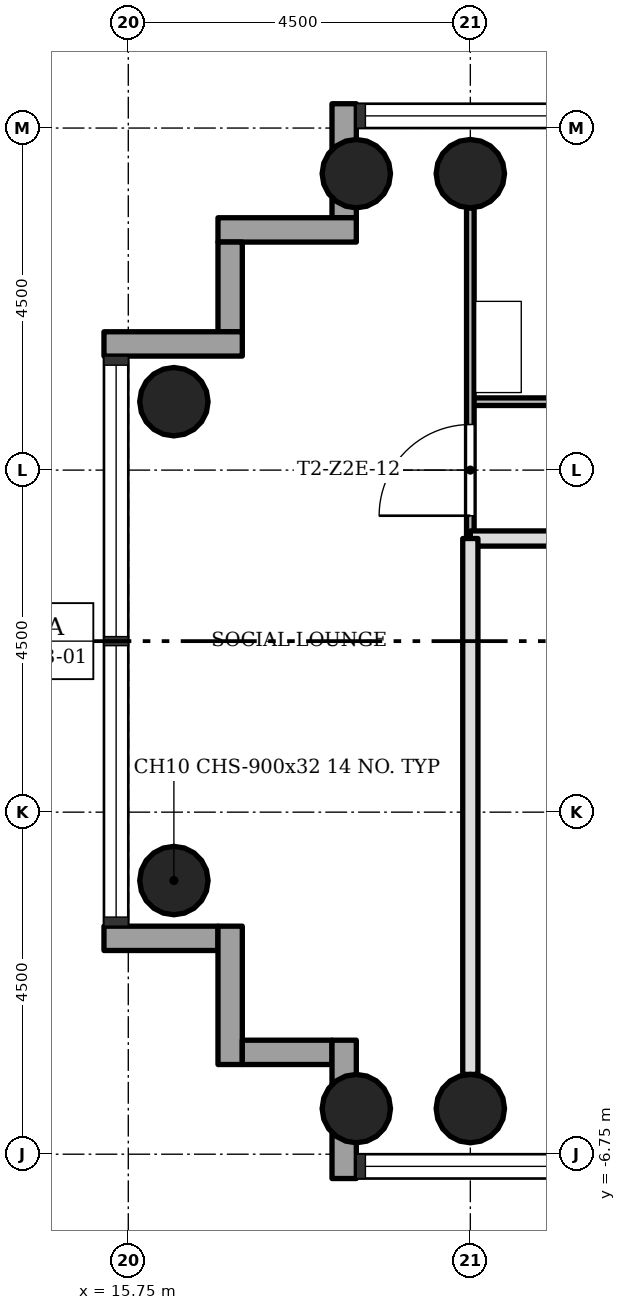
"""IFC4 building model, lengths in metres.
Left out: names, types, materials, properties, quantities, classifications, styles, units other than length and angle.
Written with IfcOpenShell. Run it as: python <this file> out.ifc"""

import sys

from ifc_helpers import new_model, si_unit, direction, frame, frame_2d, origin, origin_2d, place, context, subcontext, project, spatial, rectangle, hollow_circle, extrude, element, fill, save


model = new_model("IFC4")
c1 = context("Model", 3, precision=1e-05, world=origin(), true_north=direction((0.0, 1.0)))
c2 = subcontext(c1, "Body", "Model", "MODEL_VIEW")
j1 = project(units=[si_unit("LENGTHUNIT", "METRE"), si_unit("PLANEANGLEUNIT", "RADIAN")], contexts=[c1])
p1 = place(None, origin())
s1 = spatial("IfcSite", under=j1, at=p1, CompositionType="ELEMENT")
p2 = place(p1, origin())
s2 = spatial("IfcBuilding", under=s1, at=p2, CompositionType="ELEMENT")
p3 = place(p2, frame((0.0, 0.0, 97.0)))
s3 = spatial("IfcBuildingStorey", under=s2, at=p3, CompositionType="ELEMENT", Elevation=97.0)
for number, where, z_axis, x_axis in (
    (1, (20.25, 6.15, 0.0), (0.0, 0.0, 1.0), (1.0, 0.0, 0.0)),
    (2, (20.25, -6.15, 0.0), (0.0, 0.0, 1.0), (1.0, 0.0, 0.0)),
    (3, (18.75, 6.15, 0.0), (0.0, 0.0, 1.0), (1.0, 0.0, 0.0)),
    (4, (18.75, -6.15, 0.0), (0.0, 0.0, 1.0), (1.0, 0.0, 0.0)),
    (5, (16.35, 3.15, 0.0), (0.0, 0.0, 1.0), (1.0, 0.0, 0.0)),
    (6, (16.35, -3.15, 0.0), (0.0, 0.0, 1.0), (1.0, 0.0, 0.0)),
):
    element("IfcColumn", number, at=place(p3, frame(where, z_axis=z_axis, x_axis=x_axis)), inside=s3, PredefinedType="COLUMN", context=c2, shape_type="SweptSolid", body=[
        extrude(hollow_circle(Radius=0.45, WallThickness=0.032, at=origin_2d()), origin(), (0.0, 0.0, 1.0), 3.4),
    ])
p4 = place(p3, frame((18.59, 7.07, -0.3), z_axis=(0.0, 0.0, 1.0), x_axis=(0.0, -1.0, 0.0)))
e7 = element("IfcWall", 7, at=p4, inside=s3, PredefinedType="STANDARD", context=c2, shape_type="SweptSolid", body=[
    extrude(rectangle(XDim=1.5, YDim=0.32, at=frame_2d((0.75, 0.0))), origin(), (0.0, 0.0, 1.0), 3.4),
])
p5 = place(p3, frame((18.75, 5.41, -0.3), z_axis=(0.0, 0.0, 1.0), x_axis=(-1.0, 0.0, 0.0)))
e8 = element("IfcWall", 8, at=p5, inside=s3, PredefinedType="STANDARD", context=c2, shape_type="SweptSolid", body=[
    extrude(rectangle(XDim=1.82, YDim=0.32, at=frame_2d((0.91, 0.0))), origin(), (0.0, 0.0, 1.0), 3.4),
])
p6 = place(p3, frame((17.09, 5.25, -0.3), z_axis=(0.0, 0.0, 1.0), x_axis=(0.0, -1.0, 0.0)))
e9 = element("IfcWall", 9, at=p6, inside=s3, PredefinedType="STANDARD", context=c2, shape_type="SweptSolid", body=[
    extrude(rectangle(XDim=1.18, YDim=0.32, at=frame_2d((0.59, 0.0))), origin(), (0.0, 0.0, 1.0), 3.4),
])
p7 = place(p3, frame((17.25, 3.91, -0.3), z_axis=(0.0, 0.0, 1.0), x_axis=(-1.0, 0.0, 0.0)))
e10 = element("IfcWall", 10, at=p7, inside=s3, PredefinedType="STANDARD", context=c2, shape_type="SweptSolid", body=[
    extrude(rectangle(XDim=1.82, YDim=0.32, at=frame_2d((0.91, 0.0))), origin(), (0.0, 0.0, 1.0), 3.4),
])
p8 = place(p3, frame((15.43, -3.91, -0.3), z_axis=(0.0, 0.0, 1.0), x_axis=(1.0, 0.0, 0.0)))
e11 = element("IfcWall", 11, at=p8, inside=s3, PredefinedType="STANDARD", context=c2, shape_type="SweptSolid", body=[
    extrude(rectangle(XDim=1.5, YDim=0.32, at=frame_2d((0.75, 0.0))), origin(), (0.0, 0.0, 1.0), 3.4),
])
p9 = place(p3, frame((17.09, -3.75, -0.3), z_axis=(0.0, 0.0, 1.0), x_axis=(0.0, -1.0, 0.0)))
e12 = element("IfcWall", 12, at=p9, inside=s3, PredefinedType="STANDARD", context=c2, shape_type="SweptSolid", body=[
    extrude(rectangle(XDim=1.82, YDim=0.32, at=frame_2d((0.91, 0.0))), origin(), (0.0, 0.0, 1.0), 3.4),
])
p10 = place(p3, frame((17.25, -5.41, -0.3), z_axis=(0.0, 0.0, 1.0), x_axis=(1.0, 0.0, 0.0)))
e13 = element("IfcWall", 13, at=p10, inside=s3, PredefinedType="STANDARD", context=c2, shape_type="SweptSolid", body=[
    extrude(rectangle(XDim=1.18, YDim=0.32, at=frame_2d((0.59, 0.0))), origin(), (0.0, 0.0, 1.0), 3.4),
])
p11 = place(p3, frame((18.59, -5.25, -0.3), z_axis=(0.0, 0.0, 1.0), x_axis=(0.0, -1.0, 0.0)))
e14 = element("IfcWall", 14, at=p11, inside=s3, PredefinedType="STANDARD", context=c2, shape_type="SweptSolid", body=[
    extrude(rectangle(XDim=1.82, YDim=0.32, at=frame_2d((0.91, 0.0))), origin(), (0.0, 0.0, 1.0), 3.4),
])
p12 = place(p3, frame((27.45, 1.35, 0.0), z_axis=(0.0, 0.0, 1.0), x_axis=(-1.0, 0.0, 0.0)))
e15 = element("IfcWall", 15, at=p12, inside=s3, PredefinedType="SOLIDWALL", context=c2, shape_type="SweptSolid", body=[
    extrude(rectangle(XDim=7.2, YDim=0.2, at=frame_2d((3.6, 0.0))), origin(), (0.0, 0.0, 1.0), 3.0),
])
p13 = place(p12, frame((4.35, 0.0, 0.0)))
e16 = element("IfcOpeningElement", 16, at=p13, cuts=e15, PredefinedType="OPENING", context=c2, shape_type="SweptSolid", body=[
    extrude(rectangle(XDim=0.9, YDim=2.1, at=frame_2d((0.45, 1.05))), frame((0.0, 0.11, 0.0), z_axis=(0.0, -1.0, 0.0), x_axis=(1.0, 0.0, 0.0)), (0.0, 0.0, 1.0), 0.22),
])
p14 = place(p3, frame((29.25, 3.15, 0.0), z_axis=(0.0, 0.0, 1.0), x_axis=(-1.0, 0.0, 0.0)))
e17 = element("IfcWall", 17, at=p14, inside=s3, PredefinedType="PARTITIONING", context=c2, shape_type="SweptSolid", body=[
    extrude(rectangle(XDim=9.0, YDim=0.1, at=frame_2d((4.5, 0.0))), origin(), (0.0, 0.0, 1.0), 3.0),
])
p15 = place(p14, frame((2.55, 0.0, 0.0)))
e18 = element("IfcOpeningElement", 18, at=p15, cuts=e17, PredefinedType="OPENING", context=c2, shape_type="SweptSolid", body=[
    extrude(rectangle(XDim=0.9, YDim=2.1, at=frame_2d((0.45, 1.05))), frame((0.0, 0.06, 0.0), z_axis=(0.0, -1.0, 0.0), x_axis=(1.0, 0.0, 0.0)), (0.0, 0.0, 1.0), 0.12),
])
p16 = place(p3, frame((20.25, 1.35, 0.0), z_axis=(0.0, 0.0, 1.0), x_axis=(0.0, 1.0, 0.0)))
e19 = element("IfcWall", 19, at=p16, inside=s3, PredefinedType="PARTITIONING", context=c2, shape_type="SweptSolid", body=[
    extrude(rectangle(XDim=4.35, YDim=0.1, at=frame_2d((2.175, 0.0))), origin(), (0.0, 0.0, 1.0), 3.0),
])
p17 = place(p16, frame((0.3, 0.0, 0.0)))
e20 = element("IfcOpeningElement", 20, at=p17, cuts=e19, PredefinedType="OPENING", context=c2, shape_type="SweptSolid", body=[
    extrude(rectangle(XDim=1.2, YDim=2.1, at=frame_2d((0.6, 1.05))), frame((0.0, 0.06, 0.0), z_axis=(0.0, -1.0, 0.0), x_axis=(1.0, 0.0, 0.0)), (0.0, 0.0, 1.0), 0.12),
])
p18 = place(p3, frame((20.25, -5.7, 0.0), z_axis=(0.0, 0.0, 1.0), x_axis=(0.0, 1.0, 0.0)))
e21 = element("IfcWall", 21, at=p18, inside=s3, PredefinedType="SOLIDWALL", context=c2, shape_type="SweptSolid", body=[
    extrude(rectangle(XDim=7.05, YDim=0.2, at=frame_2d((3.525, 0.0))), origin(), (0.0, 0.0, 1.0), 3.0),
])
p19 = place(p17, origin())
e22 = element("IfcDoor", 22, at=p19, inside=s3, OperationType="SINGLE_SWING_RIGHT", PredefinedType="DOOR", context=c2, shape_type="SweptSolid", body=[
    extrude(rectangle(XDim=1.2, YDim=2.1, at=frame_2d((0.6, 1.05))), frame((0.0, 0.025, 0.0), z_axis=(0.0, -1.0, 0.0), x_axis=(1.0, 0.0, 0.0)), (0.0, 0.0, 1.0), 0.05),
])
fill(e20, e22)
save(model, sys.argv[1])
